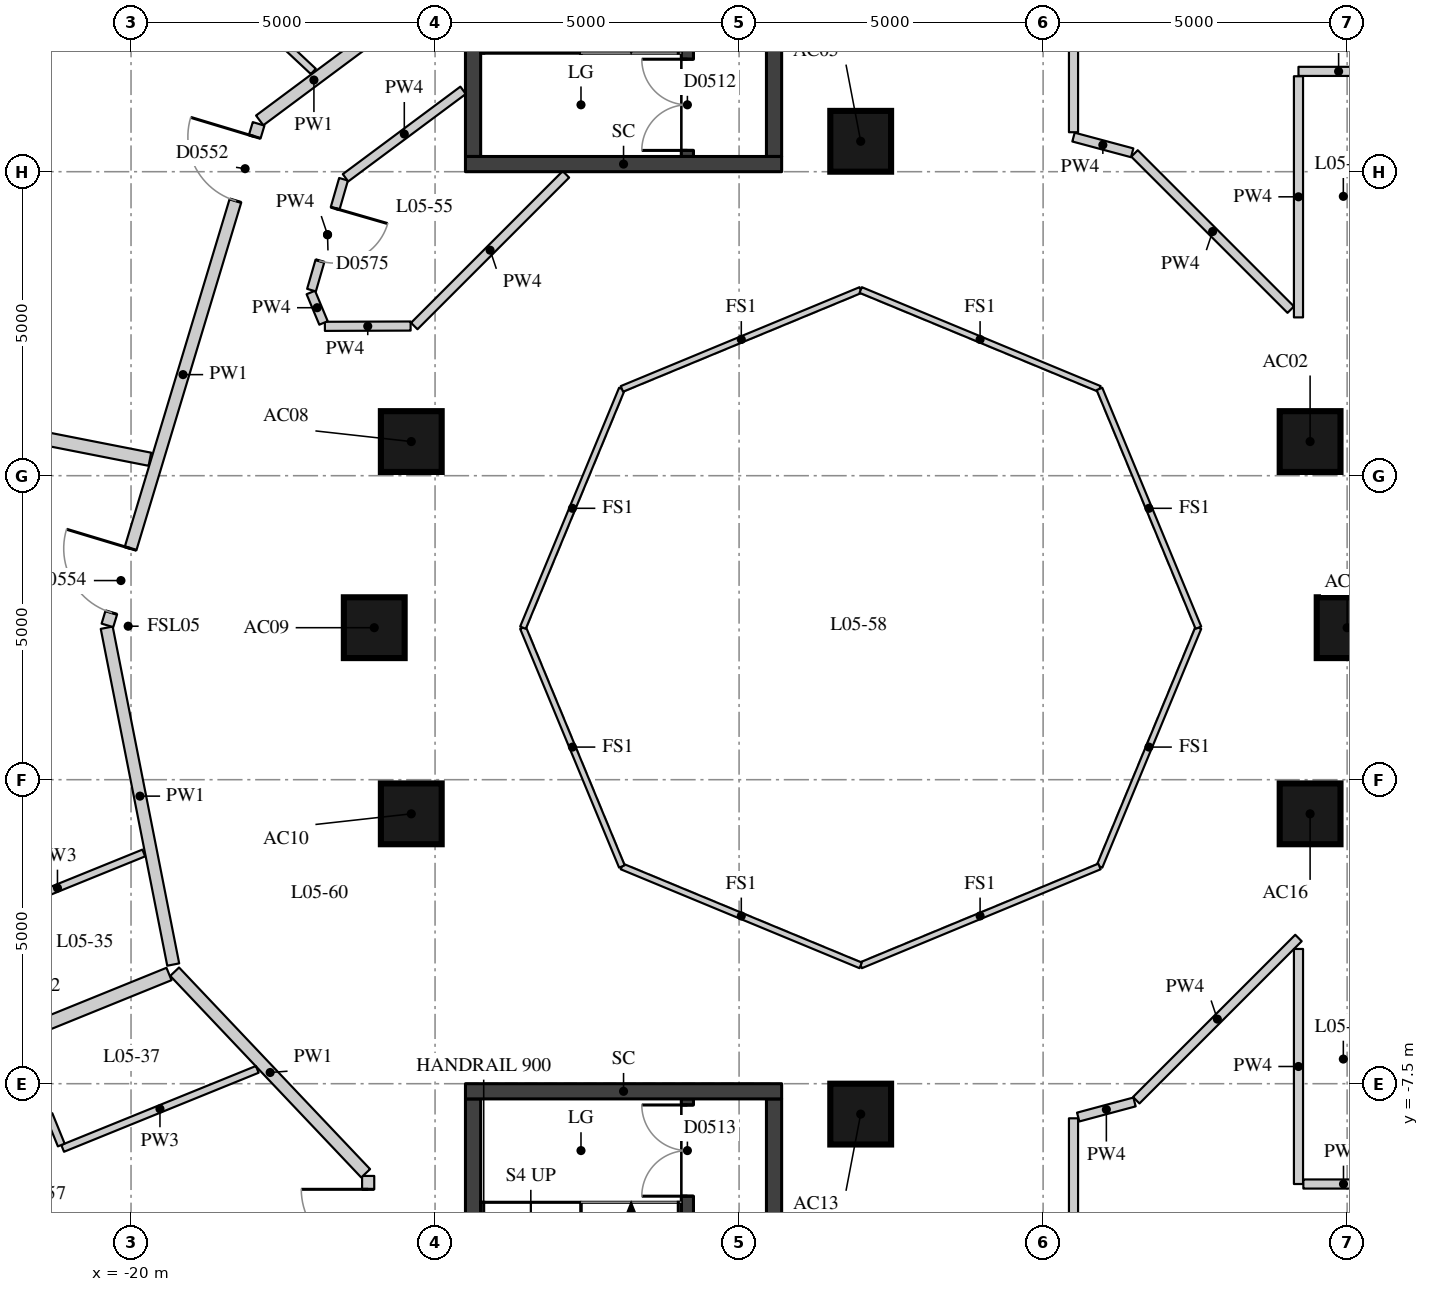
"""IFC4 building model, lengths in metres.
Left out: names, types, materials, properties, quantities, classifications, styles, units other than length and angle.
Written with IfcOpenShell. Run it as: python <this file> out.ifc"""

import sys

from ifc_helpers import new_model, si_unit, direction, frame, frame_2d, origin, origin_2d, place, context, subcontext, project, spatial, rectangle, extrude, element, fill, save


model = new_model("IFC4")
c1 = context("Model", 3, precision=1e-05, world=origin(), true_north=direction((0.0, 1.0)))
c2 = subcontext(c1, "Body", "Model", "MODEL_VIEW")
j1 = project(units=[si_unit("LENGTHUNIT", "METRE"), si_unit("PLANEANGLEUNIT", "RADIAN")], contexts=[c1])
p1 = place(None, origin())
s1 = spatial("IfcSite", under=j1, at=p1, CompositionType="ELEMENT")
p2 = place(p1, origin())
s2 = spatial("IfcBuilding", under=s1, at=p2, CompositionType="ELEMENT")
p3 = place(p2, frame((0.0, 0.0, 25.0)))
s3 = spatial("IfcBuildingStorey", under=s2, at=p3, CompositionType="ELEMENT", Elevation=25.0)
for number, where, z_axis, x_axis in (
    (1, (0.0, 0.0, 0.0), (0.0, 0.0, 1.0), (1.0, 0.0, 0.0)),
    (2, (-0.609, 3.062, 0.0), (0.0, 0.0, 1.0), (1.0, 0.0, 0.0)),
    (3, (-8.0, 8.0, 0.0), (0.0, 0.0, 1.0), (1.0, 0.0, 0.0)),
    (4, (-15.391, 3.062, 0.0), (0.0, 0.0, 1.0), (1.0, 0.0, 0.0)),
    (5, (-16.0, 0.0, 0.0), (0.0, 0.0, 1.0), (1.0, 0.0, 0.0)),
    (6, (-15.391, -3.062, 0.0), (0.0, 0.0, 1.0), (1.0, 0.0, 0.0)),
    (7, (-8.0, -8.0, 0.0), (0.0, 0.0, 1.0), (1.0, 0.0, 0.0)),
    (8, (-0.609, -3.062, 0.0), (0.0, 0.0, 1.0), (1.0, 0.0, 0.0)),
):
    element("IfcColumn", number, at=place(p3, frame(where, z_axis=z_axis, x_axis=x_axis)), inside=s3, PredefinedType="COLUMN", context=c2, shape_type="SweptSolid", body=[
        extrude(rectangle(XDim=1.0, YDim=1.0, at=origin_2d()), origin(), (0.0, 0.0, 1.0), 3.3),
    ])
p4 = place(p3, frame((-10.85, 7.75, 0.0), z_axis=(0.0, 0.0, 1.0), x_axis=(0.0, 1.0, 0.0)))
e9 = element("IfcWall", 9, at=p4, inside=s3, PredefinedType="SHEAR", context=c2, shape_type="SweptSolid", body=[
    extrude(rectangle(XDim=6.0, YDim=0.2, at=frame_2d((3.0, 0.0))), origin(), (0.0, 0.0, 1.0), 3.02),
])
p5 = place(p4, frame((0.1, 0.0, 0.0)))
e10 = element("IfcOpeningElement", 10, at=p5, cuts=e9, PredefinedType="OPENING", context=c2, shape_type="SweptSolid", body=[
    extrude(rectangle(XDim=1.5, YDim=2.1, at=frame_2d((0.75, 1.05))), frame((0.0, 0.11, 0.0), z_axis=(0.0, -1.0, 0.0), x_axis=(1.0, 0.0, 0.0)), (0.0, 0.0, 1.0), 0.22),
])
p6 = place(p3, frame((-10.85, -13.75, 0.0), z_axis=(0.0, 0.0, 1.0), x_axis=(0.0, 1.0, 0.0)))
e11 = element("IfcWall", 11, at=p6, inside=s3, PredefinedType="SHEAR", context=c2, shape_type="SweptSolid", body=[
    extrude(rectangle(XDim=6.0, YDim=0.2, at=frame_2d((3.0, 0.0))), origin(), (0.0, 0.0, 1.0), 3.02),
])
p7 = place(p6, frame((4.4, 0.0, 0.0)))
e12 = element("IfcOpeningElement", 12, at=p7, cuts=e11, PredefinedType="OPENING", context=c2, shape_type="SweptSolid", body=[
    extrude(rectangle(XDim=1.5, YDim=2.1, at=frame_2d((0.75, 1.05))), frame((0.0, 0.11, 0.0), z_axis=(0.0, -1.0, 0.0), x_axis=(1.0, 0.0, 0.0)), (0.0, 0.0, 1.0), 0.22),
])
p8 = place(p3, frame((-14.375, 7.75, -0.28), z_axis=(0.0, 0.0, 1.0), x_axis=(0.0, 1.0, 0.0)))
e13 = element("IfcWall", 13, at=p8, inside=s3, PredefinedType="SHEAR", context=c2, shape_type="SweptSolid", body=[
    extrude(rectangle(XDim=6.0, YDim=0.25, at=frame_2d((3.0, 0.0))), origin(), (0.0, 0.0, 1.0), 3.3),
])
p9 = place(p3, frame((-9.425, 7.75, -0.28), z_axis=(0.0, 0.0, 1.0), x_axis=(0.0, 1.0, 0.0)))
e14 = element("IfcWall", 14, at=p9, inside=s3, PredefinedType="SHEAR", context=c2, shape_type="SweptSolid", body=[
    extrude(rectangle(XDim=6.0, YDim=0.25, at=frame_2d((3.0, 0.0))), origin(), (0.0, 0.0, 1.0), 3.3),
])
p10 = place(p9, frame((2.1, 0.0, 0.28)))
e15 = element("IfcOpeningElement", 15, at=p10, cuts=e14, PredefinedType="OPENING", context=c2, shape_type="SweptSolid", body=[
    extrude(rectangle(XDim=1.5, YDim=2.1, at=frame_2d((0.75, 1.05))), frame((0.0, 0.135, 0.0), z_axis=(0.0, -1.0, 0.0), x_axis=(1.0, 0.0, 0.0)), (0.0, 0.0, 1.0), 0.27),
])
p11 = place(p3, frame((-14.5, 7.625, -0.28), z_axis=(0.0, 0.0, 1.0), x_axis=(1.0, 0.0, 0.0)))
e16 = element("IfcWall", 16, at=p11, inside=s3, PredefinedType="SHEAR", context=c2, shape_type="SweptSolid", body=[
    extrude(rectangle(XDim=5.2, YDim=0.25, at=frame_2d((2.6, 0.0))), origin(), (0.0, 0.0, 1.0), 3.3),
])
p12 = place(p3, frame((-14.375, -13.75, -0.28), z_axis=(0.0, 0.0, 1.0), x_axis=(0.0, 1.0, 0.0)))
e17 = element("IfcWall", 17, at=p12, inside=s3, PredefinedType="SHEAR", context=c2, shape_type="SweptSolid", body=[
    extrude(rectangle(XDim=6.0, YDim=0.25, at=frame_2d((3.0, 0.0))), origin(), (0.0, 0.0, 1.0), 3.3),
])
p13 = place(p3, frame((-9.425, -13.75, -0.28), z_axis=(0.0, 0.0, 1.0), x_axis=(0.0, 1.0, 0.0)))
e18 = element("IfcWall", 18, at=p13, inside=s3, PredefinedType="SHEAR", context=c2, shape_type="SweptSolid", body=[
    extrude(rectangle(XDim=6.0, YDim=0.25, at=frame_2d((3.0, 0.0))), origin(), (0.0, 0.0, 1.0), 3.3),
])
p14 = place(p13, frame((2.4, 0.0, 0.28)))
e19 = element("IfcOpeningElement", 19, at=p14, cuts=e18, PredefinedType="OPENING", context=c2, shape_type="SweptSolid", body=[
    extrude(rectangle(XDim=1.5, YDim=2.1, at=frame_2d((0.75, 1.05))), frame((0.0, 0.135, 0.0), z_axis=(0.0, -1.0, 0.0), x_axis=(1.0, 0.0, 0.0)), (0.0, 0.0, 1.0), 0.27),
])
p15 = place(p3, frame((-14.5, -7.625, -0.28), z_axis=(0.0, 0.0, 1.0), x_axis=(1.0, 0.0, 0.0)))
e20 = element("IfcWall", 20, at=p15, inside=s3, PredefinedType="SHEAR", context=c2, shape_type="SweptSolid", body=[
    extrude(rectangle(XDim=5.2, YDim=0.25, at=frame_2d((2.6, 0.0))), origin(), (0.0, 0.0, 1.0), 3.3),
])
p16 = place(p3, frame((-17.884, 8.344, 0.0), z_axis=(0.0, 0.0, 1.0), x_axis=(0.802260120548, 0.596974621721, 0.0)))
e21 = element("IfcWall", 21, at=p16, inside=s3, PredefinedType="PARTITIONING", context=c2, shape_type="SweptSolid", body=[
    extrude(rectangle(XDim=2.224, YDim=0.2, at=frame_2d((1.112, 0.0))), origin(), (0.0, 0.0, 1.0), 3.02),
])
p17 = place(p3, frame((-16.1, -15.064, 0.0), z_axis=(0.0, 0.0, 1.0), x_axis=(0.0, 1.0, 0.0)))
e22 = element("IfcWall", 22, at=p17, inside=s3, PredefinedType="PARTITIONING", context=c2, shape_type="SweptSolid", body=[
    extrude(rectangle(XDim=6.047, YDim=0.2, at=frame_2d((3.023, 0.0))), origin(), (0.0, 0.0, 1.0), 3.02),
])
p18 = place(p17, frame((4.727, 0.0, 0.0)))
e23 = element("IfcOpeningElement", 23, at=p18, cuts=e22, PredefinedType="OPENING", context=c2, shape_type="SweptSolid", body=[
    extrude(rectangle(XDim=1.1, YDim=2.1, at=frame_2d((0.55, 1.05))), frame((0.0, 0.11, 0.0), z_axis=(0.0, -1.0, 0.0), x_axis=(1.0, 0.0, 0.0)), (0.0, 0.0, 1.0), 0.22),
])
p19 = place(p17, frame((1.467, 0.0, 0.0)))
e24 = element("IfcOpeningElement", 24, at=p19, cuts=e22, PredefinedType="OPENING", context=c2, shape_type="SweptSolid", body=[
    extrude(rectangle(XDim=1.1, YDim=2.1, at=frame_2d((0.55, 1.05))), frame((0.0, 0.11, 0.0), z_axis=(0.0, -1.0, 0.0), x_axis=(1.0, 0.0, 0.0)), (0.0, 0.0, 1.0), 0.22),
])
p20 = place(p3, frame((-16.141, -8.974, 0.0), z_axis=(0.0, 0.0, 1.0), x_axis=(-0.687741683024, 0.725955492735, 0.0)))
e25 = element("IfcWall", 25, at=p20, inside=s3, PredefinedType="PARTITIONING", context=c2, shape_type="SweptSolid", body=[
    extrude(rectangle(XDim=4.568, YDim=0.2, at=frame_2d((2.284, 0.0))), origin(), (0.0, 0.0, 1.0), 3.02),
])
p21 = place(p3, frame((-19.306, -5.541, 0.0), z_axis=(0.0, 0.0, 1.0), x_axis=(-0.193671356151, 0.981066463501, 0.0)))
e26 = element("IfcWall", 26, at=p21, inside=s3, PredefinedType="PARTITIONING", context=c2, shape_type="SweptSolid", body=[
    extrude(rectangle(XDim=5.647, YDim=0.2, at=frame_2d((2.824, 0.0))), origin(), (0.0, 0.0, 1.0), 3.02),
])
p22 = place(p3, frame((-20.388, 0.038, 0.0), z_axis=(0.0, 0.0, 1.0), x_axis=(0.288600779805, 0.957449523419, 0.0)))
e27 = element("IfcWall", 27, at=p22, inside=s3, PredefinedType="PARTITIONING", context=c2, shape_type="SweptSolid", body=[
    extrude(rectangle(XDim=8.615, YDim=0.2, at=frame_2d((4.308, 0.0))), origin(), (0.0, 0.0, 1.0), 3.02),
])
p23 = place(p22, frame((7.295, 0.0, 0.0)))
e28 = element("IfcOpeningElement", 28, at=p23, cuts=e27, PredefinedType="OPENING", context=c2, shape_type="SweptSolid", body=[
    extrude(rectangle(XDim=1.1, YDim=2.1, at=frame_2d((0.55, 1.05))), frame((0.0, 0.11, 0.0), z_axis=(0.0, -1.0, 0.0), x_axis=(1.0, 0.0, 0.0)), (0.0, 0.0, 1.0), 0.22),
])
p24 = place(p22, frame((0.22, 0.0, 0.0)))
e29 = element("IfcOpeningElement", 29, at=p24, cuts=e27, PredefinedType="OPENING", context=c2, shape_type="SweptSolid", body=[
    extrude(rectangle(XDim=1.1, YDim=2.1, at=frame_2d((0.55, 1.05))), frame((0.0, 0.11, 0.0), z_axis=(0.0, -1.0, 0.0), x_axis=(1.0, 0.0, 0.0)), (0.0, 0.0, 1.0), 0.22),
])
p25 = place(p3, frame((0.52, 9.15, 0.0), z_axis=(0.0, 0.0, 1.0), x_axis=(-1.0, 0.0, 0.0)))
e30 = element("IfcWall", 30, at=p25, inside=s3, PredefinedType="PARTITIONING", context=c2, shape_type="SweptSolid", body=[
    extrude(rectangle(XDim=1.32, YDim=0.15, at=frame_2d((0.66, 0.0))), origin(), (0.0, 0.0, 1.0), 3.02),
])
p26 = place(p3, frame((-0.8, 9.07, 0.0), z_axis=(0.0, 0.0, 1.0), x_axis=(0.0, -1.0, 0.0)))
e31 = element("IfcWall", 31, at=p26, inside=s3, PredefinedType="PARTITIONING", context=c2, shape_type="SweptSolid", body=[
    extrude(rectangle(XDim=3.966, YDim=0.15, at=frame_2d((1.983, 0.0))), origin(), (0.0, 0.0, 1.0), 3.02),
])
p27 = place(p3, frame((-0.927, 5.231, 0.0), z_axis=(0.0, 0.0, 1.0), x_axis=(-0.707106781187, 0.707106781187, 0.0)))
e32 = element("IfcWall", 32, at=p27, inside=s3, PredefinedType="PARTITIONING", context=c2, shape_type="SweptSolid", body=[
    extrude(rectangle(XDim=3.633, YDim=0.15, at=frame_2d((1.817, 0.0))), origin(), (0.0, 0.0, 1.0), 3.02),
])
p28 = place(p3, frame((-3.535, 7.811, 0.0), z_axis=(0.0, 0.0, 1.0), x_axis=(-0.965921867197, 0.258833820183, 0.0)))
e33 = element("IfcWall", 33, at=p28, inside=s3, PredefinedType="PARTITIONING", context=c2, shape_type="SweptSolid", body=[
    extrude(rectangle(XDim=0.999, YDim=0.15, at=frame_2d((0.5, 0.0))), origin(), (0.0, 0.0, 1.0), 3.02),
])
p29 = place(p3, frame((-4.5, 8.149, 0.0), z_axis=(0.0, 0.0, 1.0), x_axis=(0.0, 1.0, 0.0)))
e34 = element("IfcWall", 34, at=p29, inside=s3, PredefinedType="PARTITIONING", context=c2, shape_type="SweptSolid", body=[
    extrude(rectangle(XDim=3.601, YDim=0.15, at=frame_2d((1.8, 0.0))), origin(), (0.0, 0.0, 1.0), 3.02),
])
p30 = place(p3, frame((-12.847, 7.456, 0.0), z_axis=(0.0, 0.0, 1.0), x_axis=(-0.707072180997, -0.707141379683, 0.0)))
e35 = element("IfcWall", 35, at=p30, inside=s3, PredefinedType="PARTITIONING", context=c2, shape_type="SweptSolid", body=[
    extrude(rectangle(XDim=3.528, YDim=0.15, at=frame_2d((1.764, 0.0))), origin(), (0.0, 0.0, 1.0), 3.02),
])
p31 = place(p3, frame((-15.402, 4.961, 0.0), z_axis=(0.0, 0.0, 1.0), x_axis=(-0.999994001087, -0.003463782477, 0.0)))
e36 = element("IfcWall", 36, at=p31, inside=s3, PredefinedType="PARTITIONING", context=c2, shape_type="SweptSolid", body=[
    extrude(rectangle(XDim=1.41, YDim=0.15, at=frame_2d((0.705, 0.0))), origin(), (0.0, 0.0, 1.0), 3.02),
])
p32 = place(p3, frame((-16.834, 5.012, 0.0), z_axis=(0.0, 0.0, 1.0), x_axis=(-0.384455737739, 0.923143426408, 0.0)))
e37 = element("IfcWall", 37, at=p32, inside=s3, PredefinedType="PARTITIONING", context=c2, shape_type="SweptSolid", body=[
    extrude(rectangle(XDim=0.543, YDim=0.15, at=frame_2d((0.271, 0.0))), origin(), (0.0, 0.0, 1.0), 3.02),
])
p33 = place(p3, frame((-17.032, 5.552, 0.0), z_axis=(0.0, 0.0, 1.0), x_axis=(0.277658349549, 0.96067988473, 0.0)))
e38 = element("IfcWall", 38, at=p33, inside=s3, PredefinedType="PARTITIONING", context=c2, shape_type="SweptSolid", body=[
    extrude(rectangle(XDim=1.898, YDim=0.15, at=frame_2d((0.949, 0.0))), origin(), (0.0, 0.0, 1.0), 3.02),
])
p34 = place(p33, frame((0.499, 0.0, 0.0)))
e39 = element("IfcOpeningElement", 39, at=p34, cuts=e38, PredefinedType="OPENING", context=c2, shape_type="SweptSolid", body=[
    extrude(rectangle(XDim=0.9, YDim=2.1, at=frame_2d((0.45, 1.05))), frame((0.0, 0.085, 0.0), z_axis=(0.0, -1.0, 0.0), x_axis=(1.0, 0.0, 0.0)), (0.0, 0.0, 1.0), 0.17),
])
p35 = place(p3, frame((-16.473, 7.4, 0.0), z_axis=(0.0, 0.0, 1.0), x_axis=(0.802267063429, 0.596965291233, 0.0)))
e40 = element("IfcWall", 40, at=p35, inside=s3, PredefinedType="PARTITIONING", context=c2, shape_type="SweptSolid", body=[
    extrude(rectangle(XDim=2.41, YDim=0.15, at=frame_2d((1.205, 0.0))), origin(), (0.0, 0.0, 1.0), 3.02),
])
p36 = place(p3, frame((-4.5, -11.67, 0.0), z_axis=(0.0, 0.0, 1.0), x_axis=(0.0, 1.0, 0.0)))
e41 = element("IfcWall", 41, at=p36, inside=s3, PredefinedType="PARTITIONING", context=c2, shape_type="SweptSolid", body=[
    extrude(rectangle(XDim=3.601, YDim=0.15, at=frame_2d((1.8, 0.0))), origin(), (0.0, 0.0, 1.0), 3.02),
])
p37 = place(p3, frame((-4.423, -8.049, 0.0), z_axis=(0.0, 0.0, 1.0), x_axis=(0.96590031435, 0.25891423819, 0.0)))
e42 = element("IfcWall", 42, at=p37, inside=s3, PredefinedType="PARTITIONING", context=c2, shape_type="SweptSolid", body=[
    extrude(rectangle(XDim=0.959, YDim=0.15, at=frame_2d((0.479, 0.0))), origin(), (0.0, 0.0, 1.0), 3.02),
])
p38 = place(p3, frame((-3.468, -7.772, 0.0), z_axis=(0.0, 0.0, 1.0), x_axis=(0.707106781187, 0.707106781187, 0.0)))
e43 = element("IfcWall", 43, at=p38, inside=s3, PredefinedType="PARTITIONING", context=c2, shape_type="SweptSolid", body=[
    extrude(rectangle(XDim=3.773, YDim=0.15, at=frame_2d((1.887, 0.0))), origin(), (0.0, 0.0, 1.0), 3.02),
])
p39 = place(p3, frame((-0.8, -5.284, 0.0), z_axis=(0.0, 0.0, 1.0), x_axis=(0.0, -1.0, 0.0)))
e44 = element("IfcWall", 44, at=p39, inside=s3, PredefinedType="PARTITIONING", context=c2, shape_type="SweptSolid", body=[
    extrude(rectangle(XDim=3.866, YDim=0.15, at=frame_2d((1.933, 0.0))), origin(), (0.0, 0.0, 1.0), 3.02),
])
p40 = place(p3, frame((-0.72, -9.15, 0.0), z_axis=(0.0, 0.0, 1.0), x_axis=(1.0, 0.0, 0.0)))
e45 = element("IfcWall", 45, at=p40, inside=s3, PredefinedType="PARTITIONING", context=c2, shape_type="SweptSolid", body=[
    extrude(rectangle(XDim=1.32, YDim=0.15, at=frame_2d((0.66, 0.0))), origin(), (0.0, 0.0, 1.0), 3.02),
])
p41 = place(p3, frame((-25.761, 3.964, 0.0), z_axis=(0.0, 0.0, 1.0), x_axis=(0.981209888948, -0.192943395406, 0.0)))
e46 = element("IfcWall", 46, at=p41, inside=s3, PredefinedType="PARTITIONING", context=c2, shape_type="SweptSolid", body=[
    extrude(rectangle(XDim=6.188, YDim=0.22, at=frame_2d((3.094, 0.0))), origin(), (0.0, 0.0, 1.0), 2.47),
])
p42 = place(p3, frame((-24.608, -7.82, 0.0), z_axis=(0.0, 0.0, 1.0), x_axis=(0.926565467624, 0.376133532415, 0.0)))
e47 = element("IfcWall", 47, at=p42, inside=s3, PredefinedType="PARTITIONING", context=c2, shape_type="SweptSolid", body=[
    extrude(rectangle(XDim=5.648, YDim=0.22, at=frame_2d((2.824, 0.0))), origin(), (0.0, 0.0, 1.0), 3.02),
])
p43 = place(p3, frame((-17.002, 9.149, 0.0), z_axis=(0.0, 0.0, 1.0), x_axis=(-0.730093035944, 0.683347758368, 0.0)))
e48 = element("IfcWall", 48, at=p43, inside=s3, PredefinedType="PARTITIONING", context=c2, shape_type="SweptSolid", body=[
    extrude(rectangle(XDim=3.437, YDim=0.12, at=frame_2d((1.718, 0.0))), origin(), (0.0, 0.0, 1.0), 3.02),
])
p44 = place(p3, frame((-19.79, -3.705, 0.0), z_axis=(0.0, 0.0, 1.0), x_axis=(-0.926585481443, -0.37608422671, 0.0)))
e49 = element("IfcWall", 49, at=p44, inside=s3, PredefinedType="PARTITIONING", context=c2, shape_type="SweptSolid", body=[
    extrude(rectangle(XDim=3.064, YDim=0.12, at=frame_2d((1.532, 0.0))), origin(), (0.0, 0.0, 1.0), 3.02),
])
p45 = place(p3, frame((-17.924, -7.264, 0.0), z_axis=(0.0, 0.0, 1.0), x_axis=(-0.926548953408, -0.376174210891, 0.0)))
e50 = element("IfcWall", 50, at=p45, inside=s3, PredefinedType="PARTITIONING", context=c2, shape_type="SweptSolid", body=[
    extrude(rectangle(XDim=3.455, YDim=0.12, at=frame_2d((1.727, 0.0))), origin(), (0.0, 0.0, 1.0), 3.02),
])
p46 = place(p3, frame((-21.147, -8.508, 0.0), z_axis=(0.0, 0.0, 1.0), x_axis=(-0.376216010002, 0.92653198208, 0.0)))
e51 = element("IfcWall", 51, at=p46, inside=s3, PredefinedType="PARTITIONING", context=c2, shape_type="SweptSolid", body=[
    extrude(rectangle(XDim=1.83, YDim=0.12, at=frame_2d((0.915, 0.0))), origin(), (0.0, 0.0, 1.0), 3.02),
])
p47 = place(p46, frame((0.54, 0.0, 0.0)))
e52 = element("IfcOpeningElement", 52, at=p47, cuts=e51, PredefinedType="OPENING", context=c2, shape_type="SweptSolid", body=[
    extrude(rectangle(XDim=0.8, YDim=2.1, at=frame_2d((0.4, 1.05))), frame((0.0, 0.07, 0.0), z_axis=(0.0, -1.0, 0.0), x_axis=(1.0, 0.0, 0.0)), (0.0, 0.0, 1.0), 0.14),
])
for number, where, z_axis, x_axis in (
    (53, (-2.446, 0.0, 0.0), (0.0, 0.0, 1.0), (-0.383, -0.924, 0.0)),
    (54, (-4.073, -3.927, 0.0), (0.0, 0.0, 1.0), (-0.924, -0.383, 0.0)),
    (55, (-8.0, -5.554, 0.0), (0.0, 0.0, 1.0), (-0.924, 0.383, 0.0)),
    (56, (-11.927, -3.927, 0.0), (0.0, 0.0, 1.0), (-0.383, 0.924, 0.0)),
    (57, (-13.554, 0.0, 0.0), (0.0, 0.0, 1.0), (0.383, 0.924, 0.0)),
    (58, (-11.927, 3.927, 0.0), (0.0, 0.0, 1.0), (0.924, 0.383, 0.0)),
    (59, (-8.0, 5.554, 0.0), (0.0, 0.0, 1.0), (0.924, -0.383, 0.0)),
    (60, (-4.073, 3.927, 0.0), (0.0, 0.0, 1.0), (0.383, -0.924, 0.0)),
):
    element("IfcWall", number, at=place(p3, frame(where, z_axis=z_axis, x_axis=x_axis)), inside=s3, PredefinedType="PARTITIONING", context=c2, shape_type="SweptSolid", body=[
        extrude(rectangle(XDim=4.251, YDim=0.1, at=frame_2d((2.125, 0.0))), origin(), (0.0, 0.0, 1.0), 3.02),
    ])
p48 = place(p5, origin())
e61 = element("IfcDoor", 61, at=p48, inside=s3, OperationType="DOUBLE_DOOR_SINGLE_SWING", PredefinedType="DOOR", context=c2, shape_type="SweptSolid", body=[
    extrude(rectangle(XDim=1.5, YDim=2.1, at=frame_2d((0.75, 1.05))), frame((0.0, 0.025, 0.0), z_axis=(0.0, -1.0, 0.0), x_axis=(1.0, 0.0, 0.0)), (0.0, 0.0, 1.0), 0.05),
])
fill(e10, e61)
p49 = place(p7, origin())
e62 = element("IfcDoor", 62, at=p49, inside=s3, OperationType="DOUBLE_DOOR_SINGLE_SWING", PredefinedType="DOOR", context=c2, shape_type="SweptSolid", body=[
    extrude(rectangle(XDim=1.5, YDim=2.1, at=frame_2d((0.75, 1.05))), frame((0.0, 0.025, 0.0), z_axis=(0.0, -1.0, 0.0), x_axis=(1.0, 0.0, 0.0)), (0.0, 0.0, 1.0), 0.05),
])
fill(e12, e62)
p50 = place(p23, origin())
e63 = element("IfcDoor", 63, at=p50, inside=s3, OperationType="SINGLE_SWING_RIGHT", PredefinedType="DOOR", context=c2, shape_type="SweptSolid", body=[
    extrude(rectangle(XDim=1.1, YDim=2.1, at=frame_2d((0.55, 1.05))), frame((0.0, 0.025, 0.0), z_axis=(0.0, -1.0, 0.0), x_axis=(1.0, 0.0, 0.0)), (0.0, 0.0, 1.0), 0.05),
])
fill(e28, e63)
p51 = place(p24, origin())
e64 = element("IfcDoor", 64, at=p51, inside=s3, OperationType="SINGLE_SWING_RIGHT", PredefinedType="DOOR", context=c2, shape_type="SweptSolid", body=[
    extrude(rectangle(XDim=1.1, YDim=2.1, at=frame_2d((0.55, 1.05))), frame((0.0, 0.025, 0.0), z_axis=(0.0, -1.0, 0.0), x_axis=(1.0, 0.0, 0.0)), (0.0, 0.0, 1.0), 0.05),
])
fill(e29, e64)
p52 = place(p18, origin())
e65 = element("IfcDoor", 65, at=p52, inside=s3, OperationType="SINGLE_SWING_RIGHT", PredefinedType="DOOR", context=c2, shape_type="SweptSolid", body=[
    extrude(rectangle(XDim=1.1, YDim=2.1, at=frame_2d((0.55, 1.05))), frame((0.0, 0.025, 0.0), z_axis=(0.0, -1.0, 0.0), x_axis=(1.0, 0.0, 0.0)), (0.0, 0.0, 1.0), 0.05),
])
fill(e23, e65)
p53 = place(p34, origin())
e66 = element("IfcDoor", 66, at=p53, inside=s3, OperationType="SINGLE_SWING_LEFT", PredefinedType="DOOR", context=c2, shape_type="SweptSolid", body=[
    extrude(rectangle(XDim=0.9, YDim=2.1, at=frame_2d((0.45, 1.05))), frame((0.0, 0.025, 0.0), z_axis=(0.0, -1.0, 0.0), x_axis=(1.0, 0.0, 0.0)), (0.0, 0.0, 1.0), 0.05),
])
fill(e39, e66)
save(model, sys.argv[1])
